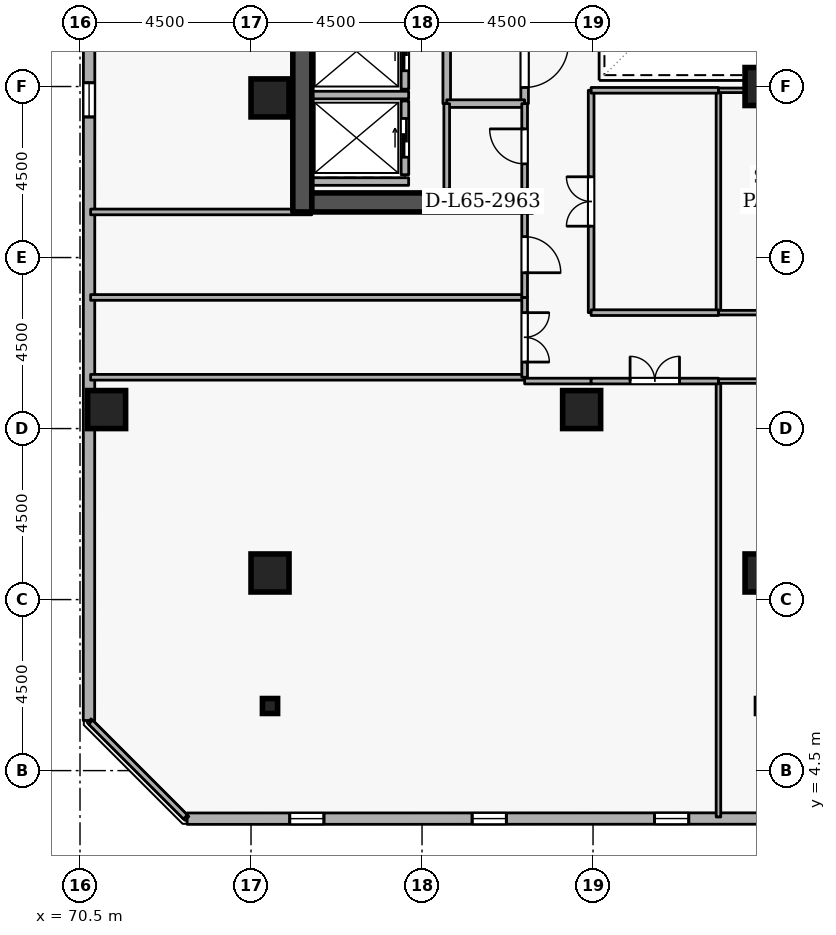
"""IFC4 building model, lengths in metres.
Left out: names, types, materials, properties, quantities, classifications, styles, units other than length and angle.
Written with IfcOpenShell. Run it as: python <this file> out.ifc"""

import sys

from ifc_helpers import new_model, si_unit, direction, frame, frame_2d, origin, origin_2d, place, context, subcontext, project, spatial, rectangle, i_section, extrude, element, fill, save


model = new_model("IFC4")
c1 = context("Model", 3, precision=1e-05, world=origin(), true_north=direction((0.0, 1.0)))
c2 = subcontext(c1, "Body", "Model", "MODEL_VIEW")
j1 = project(units=[si_unit("LENGTHUNIT", "METRE"), si_unit("PLANEANGLEUNIT", "RADIAN")], contexts=[c1])
p1 = place(None, origin())
s1 = spatial("IfcSite", under=j1, at=p1, CompositionType="ELEMENT")
p2 = place(p1, origin())
s2 = spatial("IfcBuilding", under=s1, at=p2, CompositionType="ELEMENT")
p3 = place(p2, frame((0.0, 0.0, 243.9)))
s3 = spatial("IfcBuildingStorey", under=s2, at=p3, CompositionType="ELEMENT", Elevation=243.9)
p4 = place(p3, frame((76.35, 19.2, 0.0), z_axis=(0.0, 0.0, 1.0), x_axis=(0.0, 1.0, 0.0)))
e1 = element("IfcWall", 1, at=p4, inside=s3, PredefinedType="SHEAR", context=c2, shape_type="SweptSolid", body=[
    extrude(rectangle(XDim=15.6, YDim=0.5, at=frame_2d((7.8, 0.0))), origin(), (0.0, 0.0, 1.0), 3.6),
])
p5 = place(p3, frame((76.6, 19.45, 0.0), z_axis=(0.0, 0.0, 1.0), x_axis=(1.0, 0.0, 0.0)))
e2 = element("IfcWall", 2, at=p5, inside=s3, PredefinedType="SHEAR", context=c2, shape_type="SweptSolid", body=[
    extrude(rectangle(XDim=5.8, YDim=0.5, at=frame_2d((2.9, 0.0))), origin(), (0.0, 0.0, 1.0), 3.6),
])
for number, where, z_axis, x_axis in (
    (3, (71.2, 14.0, 0.0), (0.0, 0.0, 1.0), (1.0, 0.0, 0.0)),
    (4, (88.5, 9.7, 0.0), (0.0, 0.0, 1.0), (1.0, 0.0, 0.0)),
    (5, (75.5, 9.7, 0.0), (0.0, 0.0, 1.0), (1.0, 0.0, 0.0)),
    (6, (83.7, 14.0, 0.0), (0.0, 0.0, 1.0), (1.0, 0.0, 0.0)),
    (7, (75.5, 22.2, 0.0), (0.0, 0.0, 1.0), (1.0, 0.0, 0.0)),
    (8, (88.5, 22.5, 0.0), (0.0, 0.0, 1.0), (1.0, 0.0, 0.0)),
):
    element("IfcColumn", number, at=place(p3, frame(where, z_axis=z_axis, x_axis=x_axis)), inside=s3, PredefinedType="COLUMN", context=c2, shape_type="SweptSolid", body=[
        extrude(rectangle(XDim=1.0, YDim=1.0, at=origin_2d()), origin(), (0.0, 0.0, 1.0), 3.6),
    ])
p6 = place(p3, frame((75.5, 6.2, 0.0), z_axis=(0.0, 0.0, 1.0), x_axis=(1.0, 0.0, 0.0)))
e9 = element("IfcColumn", 9, at=p6, inside=s3, PredefinedType="COLUMN", context=c2, shape_type="SweptSolid", body=[
    extrude(i_section(OverallWidth=0.399, OverallDepth=0.394, WebThickness=0.023, FlangeThickness=0.037, FilletRadius=0.015, at=origin_2d()), origin(), (0.0, 0.0, 1.0), 3.6),
])
p7 = place(p3, frame((73.319, 3.235, 0.0), z_axis=(0.0, 0.0, 1.0), x_axis=(0.999999969988, 0.000244999128, 0.0)))
e10 = element("IfcWall", 10, at=p7, inside=s3, PredefinedType="STANDARD", context=c2, shape_type="SweptSolid", body=[
    extrude(rectangle(XDim=33.881, YDim=0.3, at=frame_2d((16.94, 0.0))), origin(), (0.0, 0.0, 1.0), 2.7),
])
p8 = place(p7, frame((2.7, 0.0, 0.72)))
e11 = element("IfcOpeningElement", 11, at=p8, cuts=e10, PredefinedType="OPENING", context=c2, shape_type="SweptSolid", body=[
    extrude(rectangle(XDim=0.9, YDim=1.75, at=frame_2d((0.45, 0.875))), frame((0.0, 0.16, 0.0), z_axis=(0.0, -1.0, 0.0), x_axis=(1.0, 0.0, 0.0)), (0.0, 0.0, 1.0), 0.32),
])
p9 = place(p7, frame((7.5, 0.0, 0.72)))
e12 = element("IfcOpeningElement", 12, at=p9, cuts=e10, PredefinedType="OPENING", context=c2, shape_type="SweptSolid", body=[
    extrude(rectangle(XDim=0.9, YDim=1.75, at=frame_2d((0.45, 0.875))), frame((0.0, 0.16, 0.0), z_axis=(0.0, -1.0, 0.0), x_axis=(1.0, 0.0, 0.0)), (0.0, 0.0, 1.0), 0.32),
])
p10 = place(p7, frame((12.3, 0.0, 0.72)))
e13 = element("IfcOpeningElement", 13, at=p10, cuts=e10, PredefinedType="OPENING", context=c2, shape_type="SweptSolid", body=[
    extrude(rectangle(XDim=0.9, YDim=1.75, at=frame_2d((0.45, 0.875))), frame((0.0, 0.16, 0.0), z_axis=(0.0, -1.0, 0.0), x_axis=(1.0, 0.0, 0.0)), (0.0, 0.0, 1.0), 0.32),
])
p11 = place(p7, frame((17.1, 0.0, 0.72)))
e14 = element("IfcOpeningElement", 14, at=p11, cuts=e10, PredefinedType="OPENING", context=c2, shape_type="SweptSolid", body=[
    extrude(rectangle(XDim=0.9, YDim=1.75, at=frame_2d((0.45, 0.875))), frame((0.0, 0.16, 0.0), z_axis=(0.0, -1.0, 0.0), x_axis=(1.0, 0.0, 0.0)), (0.0, 0.0, 1.0), 0.32),
])
p12 = place(p7, frame((21.9, 0.0, 0.72)))
e15 = element("IfcOpeningElement", 15, at=p12, cuts=e10, PredefinedType="OPENING", context=c2, shape_type="SweptSolid", body=[
    extrude(rectangle(XDim=0.9, YDim=1.75, at=frame_2d((0.45, 0.875))), frame((0.0, 0.16, 0.0), z_axis=(0.0, -1.0, 0.0), x_axis=(1.0, 0.0, 0.0)), (0.0, 0.0, 1.0), 0.32),
])
p13 = place(p7, frame((26.7, 0.0, 0.72)))
e16 = element("IfcOpeningElement", 16, at=p13, cuts=e10, PredefinedType="OPENING", context=c2, shape_type="SweptSolid", body=[
    extrude(rectangle(XDim=0.9, YDim=1.75, at=frame_2d((0.45, 0.875))), frame((0.0, 0.16, 0.0), z_axis=(0.0, -1.0, 0.0), x_axis=(1.0, 0.0, 0.0)), (0.0, 0.0, 1.0), 0.32),
])
p14 = place(p3, frame((70.744, 39.699, 0.0), z_axis=(0.0, 0.0, 1.0), x_axis=(-0.000244999128, -0.999999969988, 0.0)))
e17 = element("IfcWall", 17, at=p14, inside=s3, PredefinedType="STANDARD", context=c2, shape_type="SweptSolid", body=[
    extrude(rectangle(XDim=33.881, YDim=0.3, at=frame_2d((16.94, 0.0))), origin(), (0.0, 0.0, 1.0), 2.7),
])
p15 = place(p14, frame((2.7, 0.0, 0.72)))
e18 = element("IfcOpeningElement", 18, at=p15, cuts=e17, PredefinedType="OPENING", context=c2, shape_type="SweptSolid", body=[
    extrude(rectangle(XDim=0.9, YDim=1.75, at=frame_2d((0.45, 0.875))), frame((0.0, 0.16, 0.0), z_axis=(0.0, -1.0, 0.0), x_axis=(1.0, 0.0, 0.0)), (0.0, 0.0, 1.0), 0.32),
])
p16 = place(p14, frame((7.5, 0.0, 0.72)))
e19 = element("IfcOpeningElement", 19, at=p16, cuts=e17, PredefinedType="OPENING", context=c2, shape_type="SweptSolid", body=[
    extrude(rectangle(XDim=0.9, YDim=1.75, at=frame_2d((0.45, 0.875))), frame((0.0, 0.16, 0.0), z_axis=(0.0, -1.0, 0.0), x_axis=(1.0, 0.0, 0.0)), (0.0, 0.0, 1.0), 0.32),
])
p17 = place(p14, frame((17.1, 0.0, 0.72)))
e20 = element("IfcOpeningElement", 20, at=p17, cuts=e17, PredefinedType="OPENING", context=c2, shape_type="SweptSolid", body=[
    extrude(rectangle(XDim=0.9, YDim=1.75, at=frame_2d((0.45, 0.875))), frame((0.0, 0.16, 0.0), z_axis=(0.0, -1.0, 0.0), x_axis=(1.0, 0.0, 0.0)), (0.0, 0.0, 1.0), 0.32),
])
p18 = place(p3, frame((79.05, 22.43, 0.0), z_axis=(0.0, 0.0, 1.0), x_axis=(0.0, 1.0, 0.0)))
e21 = element("IfcWall", 21, at=p18, inside=s3, PredefinedType="STANDARD", context=c2, shape_type="SweptSolid", body=[
    extrude(rectangle(XDim=1.99, YDim=0.2, at=frame_2d((0.995, 0.0))), origin(), (0.0, 0.0, 1.0), 3.34),
])
p19 = place(p18, frame((0.485, 0.0, 0.0)))
e22 = element("IfcOpeningElement", 22, at=p19, cuts=e21, PredefinedType="OPENING", context=c2, shape_type="SweptSolid", body=[
    extrude(rectangle(XDim=1.02, YDim=2.06, at=frame_2d((0.51, 1.03))), frame((0.0, 0.11, 0.0), z_axis=(0.0, -1.0, 0.0), x_axis=(1.0, 0.0, 0.0)), (0.0, 0.0, 1.0), 0.22),
])
p20 = place(p3, frame((79.05, 20.18, 0.0), z_axis=(0.0, 0.0, 1.0), x_axis=(0.0, 1.0, 0.0)))
e23 = element("IfcWall", 23, at=p20, inside=s3, PredefinedType="STANDARD", context=c2, shape_type="SweptSolid", body=[
    extrude(rectangle(XDim=1.94, YDim=0.2, at=frame_2d((0.97, 0.0))), origin(), (0.0, 0.0, 1.0), 3.34),
])
p21 = place(p20, frame((0.46, 0.0, 0.0)))
e24 = element("IfcOpeningElement", 24, at=p21, cuts=e23, PredefinedType="OPENING", context=c2, shape_type="SweptSolid", body=[
    extrude(rectangle(XDim=1.02, YDim=2.06, at=frame_2d((0.51, 1.03))), frame((0.0, 0.11, 0.0), z_axis=(0.0, -1.0, 0.0), x_axis=(1.0, 0.0, 0.0)), (0.0, 0.0, 1.0), 0.22),
])
for number, where, z_axis, x_axis in (
    (25, (76.612, 22.275, 0.0), (0.0, 0.0, 1.0), (1.0, 0.0, 0.0)),
    (26, (76.612, 20.0, 0.0), (0.0, 0.0, 1.0), (1.0, 0.0, 0.0)),
):
    element("IfcWall", number, at=place(p3, frame(where, z_axis=z_axis, x_axis=x_axis)), inside=s3, PredefinedType="STANDARD", context=c2, shape_type="SweptSolid", body=[
        extrude(rectangle(XDim=2.536, YDim=0.2, at=frame_2d((1.268, 0.0))), origin(), (0.0, 0.0, 1.0), 3.34),
    ])
p22 = place(p3, frame((80.15, 22.05, 0.0), z_axis=(0.0, 0.0, 1.0), x_axis=(0.0, 1.0, 0.0)))
e27 = element("IfcWall", 27, at=p22, inside=s3, PredefinedType="STANDARD", context=c2, shape_type="SweptSolid", body=[
    extrude(rectangle(XDim=2.0, YDim=0.2, at=frame_2d((1.0, 0.0))), origin(), (0.0, 0.0, 1.0), 3.34),
])
p23 = place(p3, frame((82.2, 24.05, 0.0), z_axis=(0.0, 0.0, 1.0), x_axis=(0.0, -1.0, 0.0)))
e28 = element("IfcWall", 28, at=p23, inside=s3, PredefinedType="STANDARD", context=c2, shape_type="SweptSolid", body=[
    extrude(rectangle(XDim=2.0, YDim=0.2, at=frame_2d((1.0, 0.0))), origin(), (0.0, 0.0, 1.0), 3.34),
])
p24 = place(p23, frame((0.425, 0.0, 0.0)))
e29 = element("IfcOpeningElement", 29, at=p24, cuts=e28, PredefinedType="OPENING", context=c2, shape_type="SweptSolid", body=[
    extrude(rectangle(XDim=1.15, YDim=2.1, at=frame_2d((0.575, 1.05))), frame((0.0, 0.11, 0.0), z_axis=(0.0, -1.0, 0.0), x_axis=(1.0, 0.0, 0.0)), (0.0, 0.0, 1.0), 0.22),
])
p25 = place(p3, frame((82.2, 22.05, 0.0), z_axis=(0.0, 0.0, 1.0), x_axis=(-1.0, 0.0, 0.0)))
e30 = element("IfcWall", 30, at=p25, inside=s3, PredefinedType="STANDARD", context=c2, shape_type="SweptSolid", body=[
    extrude(rectangle(XDim=2.05, YDim=0.2, at=frame_2d((1.025, 0.0))), origin(), (0.0, 0.0, 1.0), 3.34),
])
p26 = place(p3, frame((82.2, 19.8, 0.0), z_axis=(0.0, 0.0, 1.0), x_axis=(0.0, 1.0, 0.0)))
e31 = element("IfcWall", 31, at=p26, inside=s3, PredefinedType="PARTITIONING", context=c2, shape_type="SweptSolid", body=[
    extrude(rectangle(XDim=2.25, YDim=0.15, at=frame_2d((1.125, 0.0))), origin(), (0.0, 0.0, 1.0), 3.34),
])
p27 = place(p26, frame((0.665, 0.0, 0.0)))
e32 = element("IfcOpeningElement", 32, at=p27, cuts=e31, PredefinedType="OPENING", context=c2, shape_type="SweptSolid", body=[
    extrude(rectangle(XDim=0.92, YDim=2.08, at=frame_2d((0.46, 1.04))), frame((0.0, 0.085, 0.0), z_axis=(0.0, -1.0, 0.0), x_axis=(1.0, 0.0, 0.0)), (0.0, 0.0, 1.0), 0.17),
])
p28 = place(p3, frame((80.15, 22.05, 0.0), z_axis=(0.0, 0.0, 1.0), x_axis=(0.0, -1.0, 0.0)))
e33 = element("IfcWall", 33, at=p28, inside=s3, PredefinedType="PARTITIONING", context=c2, shape_type="SweptSolid", body=[
    extrude(rectangle(XDim=2.25, YDim=0.15, at=frame_2d((1.125, 0.0))), origin(), (0.0, 0.0, 1.0), 3.34),
])
for number, where, z_axis, x_axis in (
    (34, (82.2, 14.85, 0.0), (0.0, 0.0, 1.0), (-1.0, 0.0, 0.0)),
    (35, (70.78, 16.95, 0.0), (0.0, 0.0, 1.0), (1.0, 0.0, 0.0)),
):
    element("IfcWall", number, at=place(p3, frame(where, z_axis=z_axis, x_axis=x_axis)), inside=s3, PredefinedType="PARTITIONING", context=c2, shape_type="SweptSolid", body=[
        extrude(rectangle(XDim=11.42, YDim=0.15, at=frame_2d((5.71, 0.0))), origin(), (0.0, 0.0, 1.0), 3.34),
    ])
p29 = place(p3, frame((82.2, 16.95, 0.0), z_axis=(0.0, 0.0, 1.0), x_axis=(0.0, -1.0, 0.0)))
e36 = element("IfcWall", 36, at=p29, inside=s3, PredefinedType="PARTITIONING", context=c2, shape_type="SweptSolid", body=[
    extrude(rectangle(XDim=2.1, YDim=0.15, at=frame_2d((1.05, 0.0))), origin(), (0.0, 0.0, 1.0), 3.34),
])
p30 = place(p29, frame((0.4, 0.0, 0.0)))
e37 = element("IfcOpeningElement", 37, at=p30, cuts=e36, PredefinedType="OPENING", context=c2, shape_type="SweptSolid", body=[
    extrude(rectangle(XDim=1.3, YDim=2.12, at=frame_2d((0.65, 1.06))), frame((0.0, 0.085, 0.0), z_axis=(0.0, -1.0, 0.0), x_axis=(1.0, 0.0, 0.0)), (0.0, 0.0, 1.0), 0.17),
])
p31 = place(p3, frame((70.78, 19.2, 0.0), z_axis=(0.0, 0.0, 1.0), x_axis=(1.0, 0.0, 0.0)))
e38 = element("IfcWall", 38, at=p31, inside=s3, PredefinedType="PARTITIONING", context=c2, shape_type="SweptSolid", body=[
    extrude(rectangle(XDim=5.82, YDim=0.15, at=frame_2d((2.91, 0.0))), origin(), (0.0, 0.0, 1.0), 2.545),
])
p32 = place(p3, frame((82.2, 19.2, 0.0), z_axis=(0.0, 0.0, 1.0), x_axis=(0.0, -1.0, 0.0)))
e39 = element("IfcWall", 39, at=p32, inside=s3, PredefinedType="PARTITIONING", context=c2, shape_type="SweptSolid", body=[
    extrude(rectangle(XDim=2.25, YDim=0.15, at=frame_2d((1.125, 0.0))), origin(), (0.0, 0.0, 1.0), 3.34),
])
p33 = place(p32, frame((0.65, 0.0, 0.0)))
e40 = element("IfcOpeningElement", 40, at=p33, cuts=e39, PredefinedType="OPENING", context=c2, shape_type="SweptSolid", body=[
    extrude(rectangle(XDim=0.95, YDim=2.1, at=frame_2d((0.475, 1.05))), frame((0.0, 0.085, 0.0), z_axis=(0.0, -1.0, 0.0), x_axis=(1.0, 0.0, 0.0)), (0.0, 0.0, 1.0), 0.17),
])
p34 = place(p3, frame((87.3, 3.28, 0.0), z_axis=(0.0, 0.0, 1.0), x_axis=(0.0, 1.0, 0.0)))
e41 = element("IfcWall", 41, at=p34, inside=s3, PredefinedType="PARTITIONING", context=c2, shape_type="SweptSolid", body=[
    extrude(rectangle(XDim=11.47, YDim=0.12, at=frame_2d((5.735, 0.0))), origin(), (0.0, 0.0, 1.0), 3.34),
])
p35 = place(p3, frame((87.3, 14.75, 0.0), z_axis=(0.0, 0.0, 1.0), x_axis=(1.0, 0.0, 0.0)))
e42 = element("IfcWall", 42, at=p35, inside=s3, PredefinedType="PARTITIONING", context=c2, shape_type="SweptSolid", body=[
    extrude(rectangle(XDim=5.75, YDim=0.12, at=frame_2d((2.875, 0.0))), origin(), (0.0, 0.0, 1.0), 3.34),
])
p36 = place(p35, frame((2.35, 0.0, 0.0)))
e43 = element("IfcOpeningElement", 43, at=p36, cuts=e42, PredefinedType="OPENING", context=c2, shape_type="SweptSolid", body=[
    extrude(rectangle(XDim=1.05, YDim=2.1, at=frame_2d((0.525, 1.05))), frame((0.0, 0.07, 0.0), z_axis=(0.0, -1.0, 0.0), x_axis=(1.0, 0.0, 0.0)), (0.0, 0.0, 1.0), 0.14),
])
p37 = place(p3, frame((73.275, 3.28, 0.0), z_axis=(0.0, 0.0, 1.0), x_axis=(-0.707106781187, 0.707106781187, 0.0)))
e44 = element("IfcWall", 44, at=p37, inside=s3, PredefinedType="PARTITIONING", context=c2, shape_type="SweptSolid", body=[
    extrude(rectangle(XDim=3.528, YDim=0.15, at=frame_2d((1.764, 0.0))), origin(), (0.0, 0.0, 1.0), 3.34),
])
p38 = place(p3, frame((82.2, 14.75, 0.0), z_axis=(0.0, 0.0, 1.0), x_axis=(1.0, 0.0, 0.0)))
e45 = element("IfcWall", 45, at=p38, inside=s3, PredefinedType="PARTITIONING", context=c2, shape_type="SweptSolid", body=[
    extrude(rectangle(XDim=1.75, YDim=0.15, at=frame_2d((0.875, 0.0))), origin(), (0.0, 0.0, 1.0), 3.34),
])
p39 = place(p3, frame((83.95, 14.75, 0.0), z_axis=(0.0, 0.0, 1.0), x_axis=(1.0, 0.0, 0.0)))
e46 = element("IfcWall", 46, at=p39, inside=s3, PredefinedType="PARTITIONING", context=c2, shape_type="SweptSolid", body=[
    extrude(rectangle(XDim=3.35, YDim=0.15, at=frame_2d((1.675, 0.0))), origin(), (0.0, 0.0, 1.0), 3.34),
])
p40 = place(p39, frame((1.025, 0.0, 0.0)))
e47 = element("IfcOpeningElement", 47, at=p40, cuts=e46, PredefinedType="OPENING", context=c2, shape_type="SweptSolid", body=[
    extrude(rectangle(XDim=1.3, YDim=2.12, at=frame_2d((0.65, 1.06))), frame((0.0, 0.085, 0.0), z_axis=(0.0, -1.0, 0.0), x_axis=(1.0, 0.0, 0.0)), (0.0, 0.0, 1.0), 0.17),
])
p41 = place(p3, frame((87.3, 16.55, 0.0), z_axis=(0.0, 0.0, 1.0), x_axis=(0.0, 1.0, 0.0)))
e48 = element("IfcWall", 48, at=p41, inside=s3, PredefinedType="PARTITIONING", context=c2, shape_type="SweptSolid", body=[
    extrude(rectangle(XDim=5.85, YDim=0.12, at=frame_2d((2.925, 0.0))), origin(), (0.0, 0.0, 1.0), 3.34),
])
for number, where, z_axis, x_axis in (
    (49, (87.3, 22.4, 0.0), (0.0, 0.0, 1.0), (1.0, 0.0, 0.0)),
    (50, (93.05, 16.55, 0.0), (0.0, 0.0, 1.0), (-1.0, 0.0, 0.0)),
):
    element("IfcWall", number, at=place(p3, frame(where, z_axis=z_axis, x_axis=x_axis)), inside=s3, PredefinedType="PARTITIONING", context=c2, shape_type="SweptSolid", body=[
        extrude(rectangle(XDim=5.75, YDim=0.12, at=frame_2d((2.875, 0.0))), origin(), (0.0, 0.0, 1.0), 3.34),
    ])
p42 = place(p3, frame((83.95, 16.55, 0.0), z_axis=(0.0, 0.0, 1.0), x_axis=(0.0, 1.0, 0.0)))
e51 = element("IfcWall", 51, at=p42, inside=s3, PredefinedType="PARTITIONING", context=c2, shape_type="SweptSolid", body=[
    extrude(rectangle(XDim=5.85, YDim=0.15, at=frame_2d((2.925, 0.0))), origin(), (0.0, 0.0, 1.0), 3.34),
])
p43 = place(p42, frame((2.275, 0.0, 0.0)))
e52 = element("IfcOpeningElement", 52, at=p43, cuts=e51, PredefinedType="OPENING", context=c2, shape_type="SweptSolid", body=[
    extrude(rectangle(XDim=1.3, YDim=2.12, at=frame_2d((0.65, 1.06))), frame((0.0, 0.085, 0.0), z_axis=(0.0, -1.0, 0.0), x_axis=(1.0, 0.0, 0.0)), (0.0, 0.0, 1.0), 0.17),
])
for number, where, z_axis, x_axis in (
    (53, (83.95, 22.4, 0.0), (0.0, 0.0, 1.0), (1.0, 0.0, 0.0)),
    (54, (87.3, 16.55, 0.0), (0.0, 0.0, 1.0), (-1.0, 0.0, 0.0)),
):
    element("IfcWall", number, at=place(p3, frame(where, z_axis=z_axis, x_axis=x_axis)), inside=s3, PredefinedType="PARTITIONING", context=c2, shape_type="SweptSolid", body=[
        extrude(rectangle(XDim=3.35, YDim=0.15, at=frame_2d((1.675, 0.0))), origin(), (0.0, 0.0, 1.0), 3.34),
    ])
p44 = place(p8, origin())
e55 = element("IfcWindow", 55, at=p44, inside=s3, PartitioningType="SINGLE_PANEL", PredefinedType="WINDOW", context=c2, shape_type="SweptSolid", body=[
    extrude(rectangle(XDim=0.9, YDim=1.75, at=frame_2d((0.45, 0.875))), frame((0.0, 0.03, 0.0), z_axis=(0.0, -1.0, 0.0), x_axis=(1.0, 0.0, 0.0)), (0.0, 0.0, 1.0), 0.06),
])
fill(e11, e55)
p45 = place(p9, origin())
e56 = element("IfcWindow", 56, at=p45, inside=s3, PartitioningType="SINGLE_PANEL", PredefinedType="WINDOW", context=c2, shape_type="SweptSolid", body=[
    extrude(rectangle(XDim=0.9, YDim=1.75, at=frame_2d((0.45, 0.875))), frame((0.0, 0.03, 0.0), z_axis=(0.0, -1.0, 0.0), x_axis=(1.0, 0.0, 0.0)), (0.0, 0.0, 1.0), 0.06),
])
fill(e12, e56)
p46 = place(p10, origin())
e57 = element("IfcWindow", 57, at=p46, inside=s3, PartitioningType="SINGLE_PANEL", PredefinedType="WINDOW", context=c2, shape_type="SweptSolid", body=[
    extrude(rectangle(XDim=0.9, YDim=1.75, at=frame_2d((0.45, 0.875))), frame((0.0, 0.03, 0.0), z_axis=(0.0, -1.0, 0.0), x_axis=(1.0, 0.0, 0.0)), (0.0, 0.0, 1.0), 0.06),
])
fill(e13, e57)
p47 = place(p17, origin())
e58 = element("IfcWindow", 58, at=p47, inside=s3, PartitioningType="SINGLE_PANEL", PredefinedType="WINDOW", context=c2, shape_type="SweptSolid", body=[
    extrude(rectangle(XDim=0.9, YDim=1.75, at=frame_2d((0.45, 0.875))), frame((0.0, 0.03, 0.0), z_axis=(0.0, -1.0, 0.0), x_axis=(1.0, 0.0, 0.0)), (0.0, 0.0, 1.0), 0.06),
])
fill(e20, e58)
p48 = place(p19, origin())
e59 = element("IfcDoor", 59, at=p48, inside=s3, OperationType="SLIDING_TO_LEFT", PredefinedType="DOOR", context=c2, shape_type="SweptSolid", body=[
    extrude(rectangle(XDim=1.02, YDim=2.06, at=frame_2d((0.51, 1.03))), frame((0.0, 0.025, 0.0), z_axis=(0.0, -1.0, 0.0), x_axis=(1.0, 0.0, 0.0)), (0.0, 0.0, 1.0), 0.05),
])
fill(e22, e59)
p49 = place(p21, origin())
e60 = element("IfcDoor", 60, at=p49, inside=s3, OperationType="SLIDING_TO_LEFT", PredefinedType="DOOR", context=c2, shape_type="SweptSolid", body=[
    extrude(rectangle(XDim=1.02, YDim=2.06, at=frame_2d((0.51, 1.03))), frame((0.0, 0.025, 0.0), z_axis=(0.0, -1.0, 0.0), x_axis=(1.0, 0.0, 0.0)), (0.0, 0.0, 1.0), 0.05),
])
fill(e24, e60)
p50 = place(p27, origin())
e61 = element("IfcDoor", 61, at=p50, inside=s3, OperationType="SINGLE_SWING_RIGHT", PredefinedType="DOOR", context=c2, shape_type="SweptSolid", body=[
    extrude(rectangle(XDim=0.92, YDim=2.08, at=frame_2d((0.46, 1.04))), frame((0.0, 0.025, 0.0), z_axis=(0.0, -1.0, 0.0), x_axis=(1.0, 0.0, 0.0)), (0.0, 0.0, 1.0), 0.05),
])
fill(e32, e61)
p51 = place(p24, origin())
e62 = element("IfcDoor", 62, at=p51, inside=s3, OperationType="SINGLE_SWING_LEFT", PredefinedType="DOOR", context=c2, shape_type="SweptSolid", body=[
    extrude(rectangle(XDim=1.15, YDim=2.1, at=frame_2d((0.575, 1.05))), frame((0.0, 0.025, 0.0), z_axis=(0.0, -1.0, 0.0), x_axis=(1.0, 0.0, 0.0)), (0.0, 0.0, 1.0), 0.05),
])
fill(e29, e62)
p52 = place(p30, origin())
e63 = element("IfcDoor", 63, at=p52, inside=s3, OperationType="DOUBLE_DOOR_SINGLE_SWING", PredefinedType="DOOR", context=c2, shape_type="SweptSolid", body=[
    extrude(rectangle(XDim=1.3, YDim=2.12, at=frame_2d((0.65, 1.06))), frame((0.0, 0.025, 0.0), z_axis=(0.0, -1.0, 0.0), x_axis=(1.0, 0.0, 0.0)), (0.0, 0.0, 1.0), 0.05),
])
fill(e37, e63)
p53 = place(p33, origin())
e64 = element("IfcDoor", 64, at=p53, inside=s3, OperationType="SINGLE_SWING_RIGHT", PredefinedType="DOOR", context=c2, shape_type="SweptSolid", body=[
    extrude(rectangle(XDim=0.95, YDim=2.1, at=frame_2d((0.475, 1.05))), frame((0.0, 0.025, 0.0), z_axis=(0.0, -1.0, 0.0), x_axis=(1.0, 0.0, 0.0)), (0.0, 0.0, 1.0), 0.05),
])
fill(e40, e64)
p54 = place(p40, origin())
e65 = element("IfcDoor", 65, at=p54, inside=s3, OperationType="DOUBLE_DOOR_SINGLE_SWING", PredefinedType="DOOR", context=c2, shape_type="SweptSolid", body=[
    extrude(rectangle(XDim=1.3, YDim=2.12, at=frame_2d((0.65, 1.06))), frame((0.0, 0.025, 0.0), z_axis=(0.0, -1.0, 0.0), x_axis=(1.0, 0.0, 0.0)), (0.0, 0.0, 1.0), 0.05),
])
fill(e47, e65)
p55 = place(p43, origin())
e66 = element("IfcDoor", 66, at=p55, inside=s3, OperationType="DOUBLE_DOOR_SINGLE_SWING", PredefinedType="DOOR", context=c2, shape_type="SweptSolid", body=[
    extrude(rectangle(XDim=1.3, YDim=2.12, at=frame_2d((0.65, 1.06))), frame((0.0, 0.025, 0.0), z_axis=(0.0, -1.0, 0.0), x_axis=(1.0, 0.0, 0.0)), (0.0, 0.0, 1.0), 0.05),
])
fill(e52, e66)
save(model, sys.argv[1])
